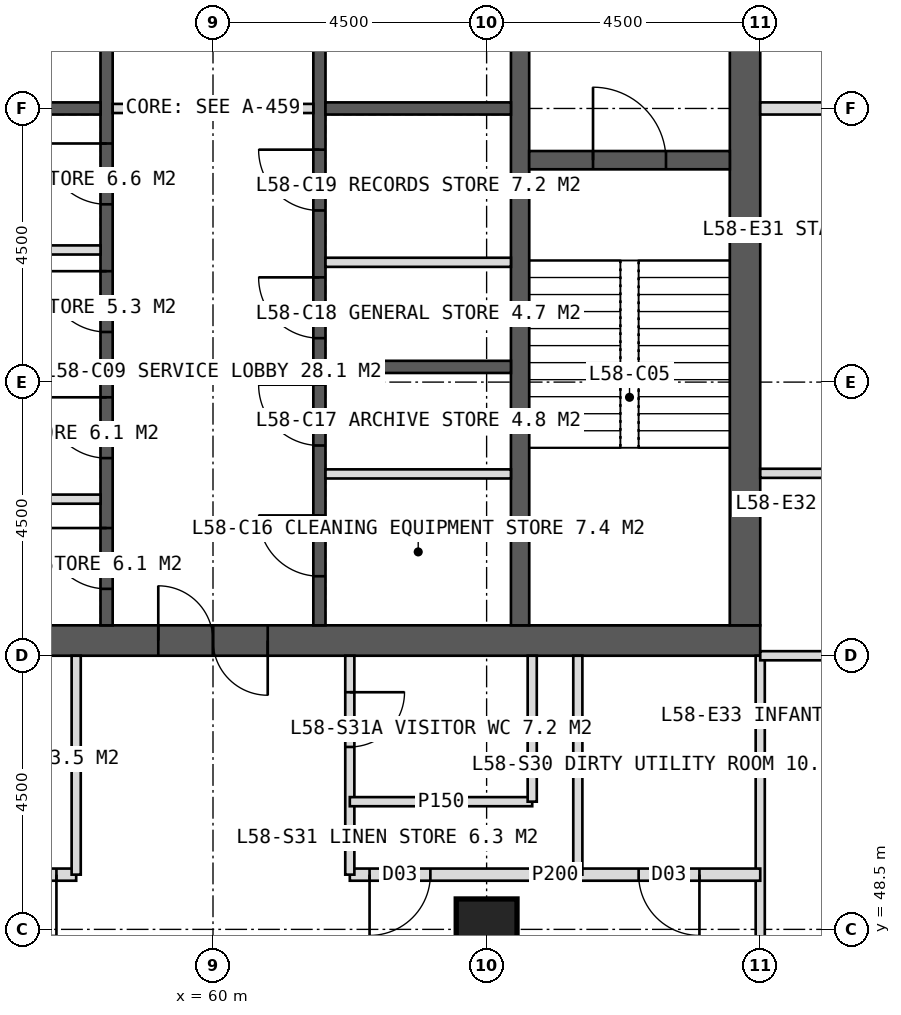
"""IFC4 building model, lengths in metres.
Left out: names, types, materials, properties, quantities, classifications, styles, units other than length and angle.
Written with IfcOpenShell. Run it as: python <this file> out.ifc"""

import sys

from ifc_helpers import new_model, si_unit, direction, frame, frame_2d, origin, origin_2d, place, context, subcontext, project, spatial, rectangle, hollow_rectangle, extrude, element, fill, save


model = new_model("IFC4")
c1 = context("Model", 3, precision=1e-05, world=origin(), true_north=direction((0.0, 1.0)))
c2 = subcontext(c1, "Body", "Model", "MODEL_VIEW")
j1 = project(units=[si_unit("LENGTHUNIT", "METRE"), si_unit("PLANEANGLEUNIT", "RADIAN")], contexts=[c1])
p1 = place(None, origin())
s1 = spatial("IfcSite", under=j1, at=p1, CompositionType="ELEMENT")
p2 = place(p1, origin())
s2 = spatial("IfcBuilding", under=s1, at=p2, CompositionType="ELEMENT")
p3 = place(p2, frame((0.0, 0.0, 241.0)))
s3 = spatial("IfcBuildingStorey", under=s2, at=p3, CompositionType="ELEMENT", Elevation=241.0)
p4 = place(p3, frame((51.0, 53.25, 0.0), z_axis=(0.0, 0.0, 1.0), x_axis=(1.0, 0.0, 0.0)))
e1 = element("IfcWall", 1, at=p4, inside=s3, PredefinedType="SHEAR", context=c2, shape_type="SweptSolid", body=[
    extrude(rectangle(XDim=18.0, YDim=0.5, at=frame_2d((9.0, 0.0))), origin(), (0.0, 0.0, 1.0), 4.0),
])
p5 = place(p4, frame((8.1, 0.0, 0.0)))
e2 = element("IfcOpeningElement", 2, at=p5, cuts=e1, PredefinedType="OPENING", context=c2, shape_type="SweptSolid", body=[
    extrude(rectangle(XDim=1.8, YDim=2.2, at=frame_2d((0.9, 1.1))), frame((0.0, 0.26, 0.0), z_axis=(0.0, -1.0, 0.0), x_axis=(1.0, 0.0, 0.0)), (0.0, 0.0, 1.0), 0.52),
])
p6 = place(p3, frame((68.75, 53.5, 0.0), z_axis=(0.0, 0.0, 1.0), x_axis=(0.0, 1.0, 0.0)))
e3 = element("IfcWall", 3, at=p6, inside=s3, PredefinedType="SHEAR", context=c2, shape_type="SweptSolid", body=[
    extrude(rectangle(XDim=17.0, YDim=0.5, at=frame_2d((8.5, 0.0))), origin(), (0.0, 0.0, 1.0), 4.0),
])
p7 = place(p6, frame((9.6, 0.0, 0.0)))
e4 = element("IfcOpeningElement", 4, at=p7, cuts=e3, PredefinedType="OPENING", context=c2, shape_type="SweptSolid", body=[
    extrude(rectangle(XDim=1.5, YDim=2.2, at=frame_2d((0.75, 1.1))), frame((0.0, 0.26, 0.0), z_axis=(0.0, -1.0, 0.0), x_axis=(1.0, 0.0, 0.0)), (0.0, 0.0, 1.0), 0.52),
])
p8 = place(p3, frame((65.05, 53.5, 0.0), z_axis=(0.0, 0.0, 1.0), x_axis=(0.0, 1.0, 0.0)))
e5 = element("IfcWall", 5, at=p8, inside=s3, PredefinedType="SHEAR", context=c2, shape_type="SweptSolid", body=[
    extrude(rectangle(XDim=17.0, YDim=0.3, at=frame_2d((8.5, 0.0))), origin(), (0.0, 0.0, 1.0), 4.0),
])
p9 = place(p3, frame((58.25, 53.5, 0.0), z_axis=(0.0, 0.0, 1.0), x_axis=(0.0, 1.0, 0.0)))
e6 = element("IfcWall", 6, at=p9, inside=s3, PredefinedType="SHEAR", context=c2, shape_type="SweptSolid", body=[
    extrude(rectangle(XDim=17.0, YDim=0.2, at=frame_2d((8.5, 0.0))), origin(), (0.0, 0.0, 1.0), 4.0),
])
p10 = place(p9, frame((0.6, 0.0, 0.0)))
e7 = element("IfcOpeningElement", 7, at=p10, cuts=e6, PredefinedType="OPENING", context=c2, shape_type="SweptSolid", body=[
    extrude(rectangle(XDim=1.0, YDim=2.1, at=frame_2d((0.5, 1.05))), frame((0.0, 0.11, 0.0), z_axis=(0.0, -1.0, 0.0), x_axis=(1.0, 0.0, 0.0)), (0.0, 0.0, 1.0), 0.22),
])
p11 = place(p9, frame((2.75, 0.0, 0.0)))
e8 = element("IfcOpeningElement", 8, at=p11, cuts=e6, PredefinedType="OPENING", context=c2, shape_type="SweptSolid", body=[
    extrude(rectangle(XDim=1.0, YDim=2.1, at=frame_2d((0.5, 1.05))), frame((0.0, 0.11, 0.0), z_axis=(0.0, -1.0, 0.0), x_axis=(1.0, 0.0, 0.0)), (0.0, 0.0, 1.0), 0.22),
])
p12 = place(p9, frame((4.824, 0.0, 0.0)))
e9 = element("IfcOpeningElement", 9, at=p12, cuts=e6, PredefinedType="OPENING", context=c2, shape_type="SweptSolid", body=[
    extrude(rectangle(XDim=1.0, YDim=2.1, at=frame_2d((0.5, 1.05))), frame((0.0, 0.11, 0.0), z_axis=(0.0, -1.0, 0.0), x_axis=(1.0, 0.0, 0.0)), (0.0, 0.0, 1.0), 0.22),
])
p13 = place(p9, frame((6.924, 0.0, 0.0)))
e10 = element("IfcOpeningElement", 10, at=p13, cuts=e6, PredefinedType="OPENING", context=c2, shape_type="SweptSolid", body=[
    extrude(rectangle(XDim=1.0, YDim=2.1, at=frame_2d((0.5, 1.05))), frame((0.0, 0.11, 0.0), z_axis=(0.0, -1.0, 0.0), x_axis=(1.0, 0.0, 0.0)), (0.0, 0.0, 1.0), 0.22),
])
p14 = place(p9, frame((10.025, 0.0, 0.0)))
e11 = element("IfcOpeningElement", 11, at=p14, cuts=e6, PredefinedType="OPENING", context=c2, shape_type="SweptSolid", body=[
    extrude(rectangle(XDim=1.4, YDim=2.2, at=frame_2d((0.7, 1.1))), frame((0.0, 0.11, 0.0), z_axis=(0.0, -1.0, 0.0), x_axis=(1.0, 0.0, 0.0)), (0.0, 0.0, 1.0), 0.22),
])
p15 = place(p9, frame((14.325, 0.0, 0.0)))
e12 = element("IfcOpeningElement", 12, at=p15, cuts=e6, PredefinedType="OPENING", context=c2, shape_type="SweptSolid", body=[
    extrude(rectangle(XDim=1.4, YDim=2.2, at=frame_2d((0.7, 1.1))), frame((0.0, 0.11, 0.0), z_axis=(0.0, -1.0, 0.0), x_axis=(1.0, 0.0, 0.0)), (0.0, 0.0, 1.0), 0.22),
])
p16 = place(p3, frame((61.75, 53.5, 0.0), z_axis=(0.0, 0.0, 1.0), x_axis=(0.0, 1.0, 0.0)))
e13 = element("IfcWall", 13, at=p16, inside=s3, PredefinedType="SHEAR", context=c2, shape_type="SweptSolid", body=[
    extrude(rectangle(XDim=17.0, YDim=0.2, at=frame_2d((8.5, 0.0))), origin(), (0.0, 0.0, 1.0), 4.0),
])
p17 = place(p16, frame((0.808, 0.0, 0.0)))
e14 = element("IfcOpeningElement", 14, at=p17, cuts=e13, PredefinedType="OPENING", context=c2, shape_type="SweptSolid", body=[
    extrude(rectangle(XDim=1.0, YDim=2.1, at=frame_2d((0.5, 1.05))), frame((0.0, 0.11, 0.0), z_axis=(0.0, -1.0, 0.0), x_axis=(1.0, 0.0, 0.0)), (0.0, 0.0, 1.0), 0.22),
])
p18 = place(p16, frame((2.958, 0.0, 0.0)))
e15 = element("IfcOpeningElement", 15, at=p18, cuts=e13, PredefinedType="OPENING", context=c2, shape_type="SweptSolid", body=[
    extrude(rectangle(XDim=1.0, YDim=2.1, at=frame_2d((0.5, 1.05))), frame((0.0, 0.11, 0.0), z_axis=(0.0, -1.0, 0.0), x_axis=(1.0, 0.0, 0.0)), (0.0, 0.0, 1.0), 0.22),
])
p19 = place(p16, frame((4.722, 0.0, 0.0)))
e16 = element("IfcOpeningElement", 16, at=p19, cuts=e13, PredefinedType="OPENING", context=c2, shape_type="SweptSolid", body=[
    extrude(rectangle(XDim=1.0, YDim=2.1, at=frame_2d((0.5, 1.05))), frame((0.0, 0.11, 0.0), z_axis=(0.0, -1.0, 0.0), x_axis=(1.0, 0.0, 0.0)), (0.0, 0.0, 1.0), 0.22),
])
p20 = place(p16, frame((6.823, 0.0, 0.0)))
e17 = element("IfcOpeningElement", 17, at=p20, cuts=e13, PredefinedType="OPENING", context=c2, shape_type="SweptSolid", body=[
    extrude(rectangle(XDim=1.0, YDim=2.1, at=frame_2d((0.5, 1.05))), frame((0.0, 0.11, 0.0), z_axis=(0.0, -1.0, 0.0), x_axis=(1.0, 0.0, 0.0)), (0.0, 0.0, 1.0), 0.22),
])
p21 = place(p16, frame((10.025, 0.0, 0.0)))
e18 = element("IfcOpeningElement", 18, at=p21, cuts=e13, PredefinedType="OPENING", context=c2, shape_type="SweptSolid", body=[
    extrude(rectangle(XDim=1.4, YDim=2.2, at=frame_2d((0.7, 1.1))), frame((0.0, 0.11, 0.0), z_axis=(0.0, -1.0, 0.0), x_axis=(1.0, 0.0, 0.0)), (0.0, 0.0, 1.0), 0.22),
])
p22 = place(p16, frame((14.325, 0.0, 0.0)))
e19 = element("IfcOpeningElement", 19, at=p22, cuts=e13, PredefinedType="OPENING", context=c2, shape_type="SweptSolid", body=[
    extrude(rectangle(XDim=1.4, YDim=2.2, at=frame_2d((0.7, 1.1))), frame((0.0, 0.11, 0.0), z_axis=(0.0, -1.0, 0.0), x_axis=(1.0, 0.0, 0.0)), (0.0, 0.0, 1.0), 0.22),
])
for number, where, z_axis, x_axis in (
    (20, (55.1, 57.75, 0.0), (0.0, 0.0, 1.0), (1.0, 0.0, 0.0)),
    (21, (61.85, 57.75, 0.0), (0.0, 0.0, 1.0), (1.0, 0.0, 0.0)),
    (22, (55.1, 62.0, 0.0), (0.0, 0.0, 1.0), (1.0, 0.0, 0.0)),
    (23, (61.85, 62.0, 0.0), (0.0, 0.0, 1.0), (1.0, 0.0, 0.0)),
):
    element("IfcWall", number, at=place(p3, frame(where, z_axis=z_axis, x_axis=x_axis)), inside=s3, PredefinedType="SHEAR", context=c2, shape_type="SweptSolid", body=[
        extrude(rectangle(XDim=3.05, YDim=0.2, at=frame_2d((1.525, 0.0))), origin(), (0.0, 0.0, 1.0), 4.0),
    ])
p23 = place(p3, frame((65.2, 61.15, 0.0), z_axis=(0.0, 0.0, 1.0), x_axis=(1.0, 0.0, 0.0)))
e24 = element("IfcWall", 24, at=p23, inside=s3, PredefinedType="SHEAR", context=c2, shape_type="SweptSolid", body=[
    extrude(rectangle(XDim=3.3, YDim=0.3, at=frame_2d((1.65, 0.0))), origin(), (0.0, 0.0, 1.0), 4.0),
])
p24 = place(p23, frame((1.05, 0.0, 0.0)))
e25 = element("IfcOpeningElement", 25, at=p24, cuts=e24, PredefinedType="OPENING", context=c2, shape_type="SweptSolid", body=[
    extrude(rectangle(XDim=1.2, YDim=2.1, at=frame_2d((0.6, 1.05))), frame((0.0, 0.16, 0.0), z_axis=(0.0, -1.0, 0.0), x_axis=(1.0, 0.0, 0.0)), (0.0, 0.0, 1.0), 0.32),
])
p25 = place(p3, frame((64.5, 48.5, 0.0), z_axis=(0.0, 0.0, 1.0), x_axis=(1.0, 0.0, 0.0)))
e26 = element("IfcColumn", 26, at=p25, inside=s3, PredefinedType="COLUMN", context=c2, shape_type="SweptSolid", body=[
    extrude(hollow_rectangle(XDim=1.0, YDim=1.0, WallThickness=0.1, at=origin_2d()), origin(), (0.0, 0.0, 1.0), 4.0),
])
p26 = place(p3, frame((69.0, 53.0, 0.0), z_axis=(0.0, 0.0, 1.0), x_axis=(0.0, -1.0, 0.0)))
e27 = element("IfcWall", 27, at=p26, inside=s3, PredefinedType="PARTITIONING", context=c2, shape_type="SweptSolid", body=[
    extrude(rectangle(XDim=5.1, YDim=0.15, at=frame_2d((2.55, 0.0))), origin(), (0.0, 0.0, 1.0), 3.75),
])
p27 = place(p3, frame((69.0, 49.4, 0.0), z_axis=(0.0, 0.0, 1.0), x_axis=(-1.0, 0.0, 0.0)))
e28 = element("IfcWall", 28, at=p27, inside=s3, PredefinedType="PARTITIONING", context=c2, shape_type="SweptSolid", body=[
    extrude(rectangle(XDim=6.75, YDim=0.2, at=frame_2d((3.375, 0.0))), origin(), (0.0, 0.0, 1.0), 3.75),
])
p28 = place(p27, frame((1.0, 0.0, 0.0)))
e29 = element("IfcOpeningElement", 29, at=p28, cuts=e28, PredefinedType="OPENING", context=c2, shape_type="SweptSolid", body=[
    extrude(rectangle(XDim=1.0, YDim=2.1, at=frame_2d((0.5, 1.05))), frame((0.0, 0.11, 0.0), z_axis=(0.0, -1.0, 0.0), x_axis=(1.0, 0.0, 0.0)), (0.0, 0.0, 1.0), 0.22),
])
p29 = place(p27, frame((5.425, 0.0, 0.0)))
e30 = element("IfcOpeningElement", 30, at=p29, cuts=e28, PredefinedType="OPENING", context=c2, shape_type="SweptSolid", body=[
    extrude(rectangle(XDim=1.0, YDim=2.1, at=frame_2d((0.5, 1.05))), frame((0.0, 0.11, 0.0), z_axis=(0.0, -1.0, 0.0), x_axis=(1.0, 0.0, 0.0)), (0.0, 0.0, 1.0), 0.22),
])
p30 = place(p3, frame((57.75, 49.4, 0.0), z_axis=(0.0, 0.0, 1.0), x_axis=(-1.0, 0.0, 0.0)))
e31 = element("IfcWall", 31, at=p30, inside=s3, PredefinedType="PARTITIONING", context=c2, shape_type="SweptSolid", body=[
    extrude(rectangle(XDim=11.85, YDim=0.2, at=frame_2d((5.925, 0.0))), origin(), (0.0, 0.0, 1.0), 3.75),
])
p31 = place(p30, frame((0.325, 0.0, 0.0)))
e32 = element("IfcOpeningElement", 32, at=p31, cuts=e31, PredefinedType="OPENING", context=c2, shape_type="SweptSolid", body=[
    extrude(rectangle(XDim=1.0, YDim=2.1, at=frame_2d((0.5, 1.05))), frame((0.0, 0.11, 0.0), z_axis=(0.0, -1.0, 0.0), x_axis=(1.0, 0.0, 0.0)), (0.0, 0.0, 1.0), 0.22),
])
p32 = place(p30, frame((4.75, 0.0, 0.0)))
e33 = element("IfcOpeningElement", 33, at=p32, cuts=e31, PredefinedType="OPENING", context=c2, shape_type="SweptSolid", body=[
    extrude(rectangle(XDim=1.0, YDim=2.1, at=frame_2d((0.5, 1.05))), frame((0.0, 0.11, 0.0), z_axis=(0.0, -1.0, 0.0), x_axis=(1.0, 0.0, 0.0)), (0.0, 0.0, 1.0), 0.22),
])
p33 = place(p30, frame((8.8, 0.0, 0.0)))
e34 = element("IfcOpeningElement", 34, at=p33, cuts=e31, PredefinedType="OPENING", context=c2, shape_type="SweptSolid", body=[
    extrude(rectangle(XDim=1.0, YDim=2.1, at=frame_2d((0.5, 1.05))), frame((0.0, 0.11, 0.0), z_axis=(0.0, -1.0, 0.0), x_axis=(1.0, 0.0, 0.0)), (0.0, 0.0, 1.0), 0.22),
])
p34 = place(p3, frame((62.25, 53.0, 0.0), z_axis=(0.0, 0.0, 1.0), x_axis=(0.0, -1.0, 0.0)))
e35 = element("IfcWall", 35, at=p34, inside=s3, PredefinedType="PARTITIONING", context=c2, shape_type="SweptSolid", body=[
    extrude(rectangle(XDim=3.6, YDim=0.15, at=frame_2d((1.8, 0.0))), origin(), (0.0, 0.0, 1.0), 3.75),
])
p35 = place(p34, frame((0.6, 0.0, 0.0)))
e36 = element("IfcOpeningElement", 36, at=p35, cuts=e35, PredefinedType="OPENING", context=c2, shape_type="SweptSolid", body=[
    extrude(rectangle(XDim=0.9, YDim=2.1, at=frame_2d((0.45, 1.05))), frame((0.0, 0.085, 0.0), z_axis=(0.0, -1.0, 0.0), x_axis=(1.0, 0.0, 0.0)), (0.0, 0.0, 1.0), 0.17),
])
for number, where, z_axis, x_axis in (
    (37, (57.75, 53.0, 0.0), (0.0, 0.0, 1.0), (0.0, -1.0, 0.0)),
    (38, (66.0, 53.0, 0.0), (0.0, 0.0, 1.0), (0.0, -1.0, 0.0)),
):
    element("IfcWall", number, at=place(p3, frame(where, z_axis=z_axis, x_axis=x_axis)), inside=s3, PredefinedType="PARTITIONING", context=c2, shape_type="SweptSolid", body=[
        extrude(rectangle(XDim=3.6, YDim=0.15, at=frame_2d((1.8, 0.0))), origin(), (0.0, 0.0, 1.0), 3.75),
    ])
p36 = place(p3, frame((65.25, 50.6, 0.0), z_axis=(0.0, 0.0, 1.0), x_axis=(-1.0, 0.0, 0.0)))
e39 = element("IfcWall", 39, at=p36, inside=s3, PredefinedType="PARTITIONING", context=c2, shape_type="SweptSolid", body=[
    extrude(rectangle(XDim=3.0, YDim=0.15, at=frame_2d((1.5, 0.0))), origin(), (0.0, 0.0, 1.0), 3.75),
])
p37 = place(p3, frame((65.25, 53.0, 0.0), z_axis=(0.0, 0.0, 1.0), x_axis=(0.0, -1.0, 0.0)))
e40 = element("IfcWall", 40, at=p37, inside=s3, PredefinedType="PARTITIONING", context=c2, shape_type="SweptSolid", body=[
    extrude(rectangle(XDim=2.4, YDim=0.15, at=frame_2d((1.2, 0.0))), origin(), (0.0, 0.0, 1.0), 3.75),
])
p38 = place(p3, frame((69.0, 62.0, 0.0), z_axis=(0.0, 0.0, 1.0), x_axis=(1.0, 0.0, 0.0)))
e41 = element("IfcWall", 41, at=p38, inside=s3, PredefinedType="SOLIDWALL", context=c2, shape_type="SweptSolid", body=[
    extrude(rectangle(XDim=5.1, YDim=0.2, at=frame_2d((2.55, 0.0))), origin(), (0.0, 0.0, 1.0), 2.95),
])
for number, where, z_axis, x_axis in (
    (42, (69.0, 56.0, 0.0), (0.0, 0.0, 1.0), (1.0, 0.0, 0.0)),
    (43, (69.0, 53.0, 0.0), (0.0, 0.0, 1.0), (1.0, 0.0, 0.0)),
):
    element("IfcWall", number, at=place(p3, frame(where, z_axis=z_axis, x_axis=x_axis)), inside=s3, PredefinedType="PARTITIONING", context=c2, shape_type="SweptSolid", body=[
        extrude(rectangle(XDim=5.1, YDim=0.15, at=frame_2d((2.55, 0.0))), origin(), (0.0, 0.0, 1.0), 3.75),
    ])
for number, where, z_axis, x_axis in (
    (44, (55.1, 55.575, 0.0), (0.0, 0.0, 1.0), (1.0, 0.0, 0.0)),
    (45, (61.85, 55.99, 0.0), (0.0, 0.0, 1.0), (1.0, 0.0, 0.0)),
    (46, (55.1, 59.673, 0.0), (0.0, 0.0, 1.0), (1.0, 0.0, 0.0)),
    (47, (61.85, 59.47, 0.0), (0.0, 0.0, 1.0), (1.0, 0.0, 0.0)),
):
    element("IfcWall", number, at=place(p3, frame(where, z_axis=z_axis, x_axis=x_axis)), inside=s3, PredefinedType="PARTITIONING", context=c2, shape_type="SweptSolid", body=[
        extrude(rectangle(XDim=3.05, YDim=0.15, at=frame_2d((1.525, 0.0))), origin(), (0.0, 0.0, 1.0), 3.75),
    ])
p39 = place(p3, frame((58.35, 62.0, 0.0), z_axis=(0.0, 0.0, 1.0), x_axis=(1.0, 0.0, 0.0)))
e48 = element("IfcWall", 48, at=p39, inside=s3, PredefinedType="PARTITIONING", context=c2, shape_type="SweptSolid", body=[
    extrude(rectangle(XDim=3.3, YDim=0.15, at=frame_2d((1.65, 0.0))), origin(), (0.0, 0.0, 1.0), 3.75),
])
p40 = place(p28, origin())
e49 = element("IfcDoor", 49, at=p40, inside=s3, OperationType="SINGLE_SWING_LEFT", PredefinedType="DOOR", context=c2, shape_type="SweptSolid", body=[
    extrude(rectangle(XDim=1.0, YDim=2.1, at=frame_2d((0.5, 1.05))), frame((0.0, 0.025, 0.0), z_axis=(0.0, -1.0, 0.0), x_axis=(1.0, 0.0, 0.0)), (0.0, 0.0, 1.0), 0.05),
])
fill(e29, e49)
p41 = place(p35, origin())
e50 = element("IfcDoor", 50, at=p41, inside=s3, OperationType="SINGLE_SWING_LEFT", PredefinedType="DOOR", context=c2, shape_type="SweptSolid", body=[
    extrude(rectangle(XDim=0.9, YDim=2.1, at=frame_2d((0.45, 1.05))), frame((0.0, 0.025, 0.0), z_axis=(0.0, -1.0, 0.0), x_axis=(1.0, 0.0, 0.0)), (0.0, 0.0, 1.0), 0.05),
])
fill(e36, e50)
p42 = place(p29, origin())
e51 = element("IfcDoor", 51, at=p42, inside=s3, OperationType="SINGLE_SWING_RIGHT", PredefinedType="DOOR", context=c2, shape_type="SweptSolid", body=[
    extrude(rectangle(XDim=1.0, YDim=2.1, at=frame_2d((0.5, 1.05))), frame((0.0, 0.025, 0.0), z_axis=(0.0, -1.0, 0.0), x_axis=(1.0, 0.0, 0.0)), (0.0, 0.0, 1.0), 0.05),
])
fill(e30, e51)
p43 = place(p31, origin())
e52 = element("IfcDoor", 52, at=p43, inside=s3, OperationType="SINGLE_SWING_LEFT", PredefinedType="DOOR", context=c2, shape_type="SweptSolid", body=[
    extrude(rectangle(XDim=1.0, YDim=2.1, at=frame_2d((0.5, 1.05))), frame((0.0, 0.025, 0.0), z_axis=(0.0, -1.0, 0.0), x_axis=(1.0, 0.0, 0.0)), (0.0, 0.0, 1.0), 0.05),
])
fill(e32, e52)
p44 = place(p24, origin())
e53 = element("IfcDoor", 53, at=p44, inside=s3, OperationType="SINGLE_SWING_LEFT", PredefinedType="DOOR", context=c2, shape_type="SweptSolid", body=[
    extrude(rectangle(XDim=1.2, YDim=2.1, at=frame_2d((0.6, 1.05))), frame((0.0, 0.025, 0.0), z_axis=(0.0, -1.0, 0.0), x_axis=(1.0, 0.0, 0.0)), (0.0, 0.0, 1.0), 0.05),
])
fill(e25, e53)
p45 = place(p10, origin())
e54 = element("IfcDoor", 54, at=p45, inside=s3, OperationType="SINGLE_SWING_RIGHT", PredefinedType="DOOR", context=c2, shape_type="SweptSolid", body=[
    extrude(rectangle(XDim=1.0, YDim=2.1, at=frame_2d((0.5, 1.05))), frame((0.0, 0.025, 0.0), z_axis=(0.0, -1.0, 0.0), x_axis=(1.0, 0.0, 0.0)), (0.0, 0.0, 1.0), 0.05),
])
fill(e7, e54)
p46 = place(p11, origin())
e55 = element("IfcDoor", 55, at=p46, inside=s3, OperationType="SINGLE_SWING_RIGHT", PredefinedType="DOOR", context=c2, shape_type="SweptSolid", body=[
    extrude(rectangle(XDim=1.0, YDim=2.1, at=frame_2d((0.5, 1.05))), frame((0.0, 0.025, 0.0), z_axis=(0.0, -1.0, 0.0), x_axis=(1.0, 0.0, 0.0)), (0.0, 0.0, 1.0), 0.05),
])
fill(e8, e55)
p47 = place(p17, origin())
e56 = element("IfcDoor", 56, at=p47, inside=s3, OperationType="SINGLE_SWING_RIGHT", PredefinedType="DOOR", context=c2, shape_type="SweptSolid", body=[
    extrude(rectangle(XDim=1.0, YDim=2.1, at=frame_2d((0.5, 1.05))), frame((0.0, 0.025, 0.0), z_axis=(0.0, -1.0, 0.0), x_axis=(1.0, 0.0, 0.0)), (0.0, 0.0, 1.0), 0.05),
])
fill(e14, e56)
p48 = place(p18, origin())
e57 = element("IfcDoor", 57, at=p48, inside=s3, OperationType="SINGLE_SWING_RIGHT", PredefinedType="DOOR", context=c2, shape_type="SweptSolid", body=[
    extrude(rectangle(XDim=1.0, YDim=2.1, at=frame_2d((0.5, 1.05))), frame((0.0, 0.025, 0.0), z_axis=(0.0, -1.0, 0.0), x_axis=(1.0, 0.0, 0.0)), (0.0, 0.0, 1.0), 0.05),
])
fill(e15, e57)
p49 = place(p12, origin())
e58 = element("IfcDoor", 58, at=p49, inside=s3, OperationType="SINGLE_SWING_RIGHT", PredefinedType="DOOR", context=c2, shape_type="SweptSolid", body=[
    extrude(rectangle(XDim=1.0, YDim=2.1, at=frame_2d((0.5, 1.05))), frame((0.0, 0.025, 0.0), z_axis=(0.0, -1.0, 0.0), x_axis=(1.0, 0.0, 0.0)), (0.0, 0.0, 1.0), 0.05),
])
fill(e9, e58)
p50 = place(p13, origin())
e59 = element("IfcDoor", 59, at=p50, inside=s3, OperationType="SINGLE_SWING_RIGHT", PredefinedType="DOOR", context=c2, shape_type="SweptSolid", body=[
    extrude(rectangle(XDim=1.0, YDim=2.1, at=frame_2d((0.5, 1.05))), frame((0.0, 0.025, 0.0), z_axis=(0.0, -1.0, 0.0), x_axis=(1.0, 0.0, 0.0)), (0.0, 0.0, 1.0), 0.05),
])
fill(e10, e59)
p51 = place(p19, origin())
e60 = element("IfcDoor", 60, at=p51, inside=s3, OperationType="SINGLE_SWING_RIGHT", PredefinedType="DOOR", context=c2, shape_type="SweptSolid", body=[
    extrude(rectangle(XDim=1.0, YDim=2.1, at=frame_2d((0.5, 1.05))), frame((0.0, 0.025, 0.0), z_axis=(0.0, -1.0, 0.0), x_axis=(1.0, 0.0, 0.0)), (0.0, 0.0, 1.0), 0.05),
])
fill(e16, e60)
p52 = place(p20, origin())
e61 = element("IfcDoor", 61, at=p52, inside=s3, OperationType="SINGLE_SWING_RIGHT", PredefinedType="DOOR", context=c2, shape_type="SweptSolid", body=[
    extrude(rectangle(XDim=1.0, YDim=2.1, at=frame_2d((0.5, 1.05))), frame((0.0, 0.025, 0.0), z_axis=(0.0, -1.0, 0.0), x_axis=(1.0, 0.0, 0.0)), (0.0, 0.0, 1.0), 0.05),
])
fill(e17, e61)
p53 = place(p5, origin())
e62 = element("IfcDoor", 62, at=p53, inside=s3, OperationType="DOUBLE_DOOR_SINGLE_SWING", PredefinedType="DOOR", context=c2, shape_type="SweptSolid", body=[
    extrude(rectangle(XDim=1.8, YDim=2.2, at=frame_2d((0.9, 1.1))), frame((0.0, 0.025, 0.0), z_axis=(0.0, -1.0, 0.0), x_axis=(1.0, 0.0, 0.0)), (0.0, 0.0, 1.0), 0.05),
])
fill(e2, e62)
save(model, sys.argv[1])
